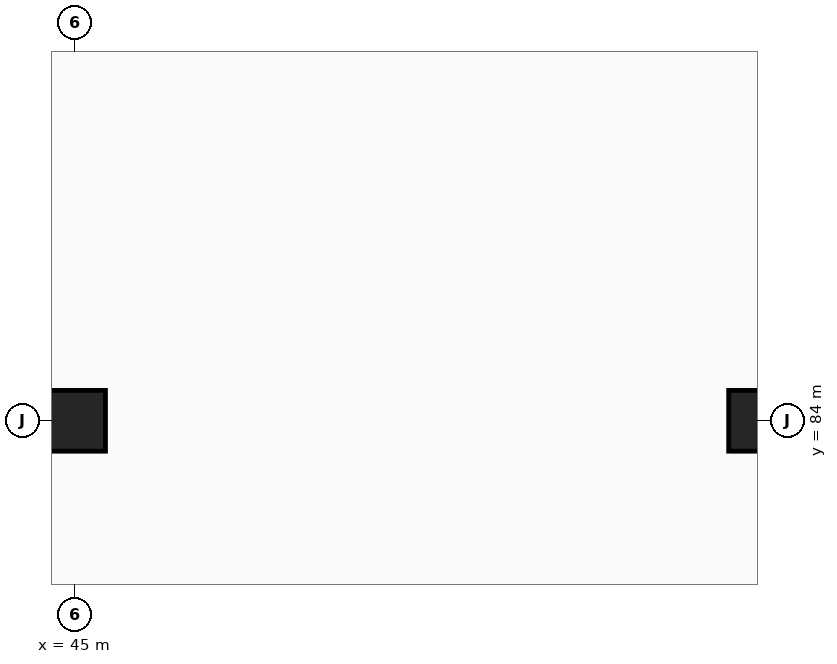
"""IFC4 building model, lengths in metres.
Left out: names, types, materials, properties, quantities, classifications, styles, units other than length and angle.
Written with IfcOpenShell. Run it as: python <this file> out.ifc"""

import sys

from ifc_helpers import new_model, si_unit, direction, frame, origin, origin_2d, place, context, subcontext, project, spatial, rectangle, extrude, element, save


model = new_model("IFC4")
c1 = context("Model", 3, precision=1e-05, world=origin(), true_north=direction((0.0, 1.0)))
c2 = subcontext(c1, "Body", "Model", "MODEL_VIEW")
j1 = project(units=[si_unit("LENGTHUNIT", "METRE"), si_unit("PLANEANGLEUNIT", "RADIAN")], contexts=[c1])
p1 = place(None, origin())
s1 = spatial("IfcSite", under=j1, at=p1, CompositionType="ELEMENT")
p2 = place(p1, origin())
s2 = spatial("IfcBuilding", under=s1, at=p2, CompositionType="ELEMENT")
p3 = place(p2, frame((0.0, 0.0, -5.1)))
s3 = spatial("IfcBuildingStorey", under=s2, at=p3, CompositionType="ELEMENT", Elevation=-5.1)
for number, where, z_axis, x_axis in (
    (1, (45.0, 84.0, 0.0), (0.0, 0.0, 1.0), (1.0, 0.0, 0.0)),
    (2, (54.0, 84.0, 0.0), (0.0, 0.0, 1.0), (1.0, 0.0, 0.0)),
):
    element("IfcColumn", number, at=place(p3, frame(where, z_axis=z_axis, x_axis=x_axis)), inside=s3, PredefinedType="COLUMN", context=c2, shape_type="SweptSolid", body=[
        extrude(rectangle(XDim=0.8, YDim=0.8, at=origin_2d()), origin(), (0.0, 0.0, 1.0), 5.1),
    ])
save(model, sys.argv[1])
